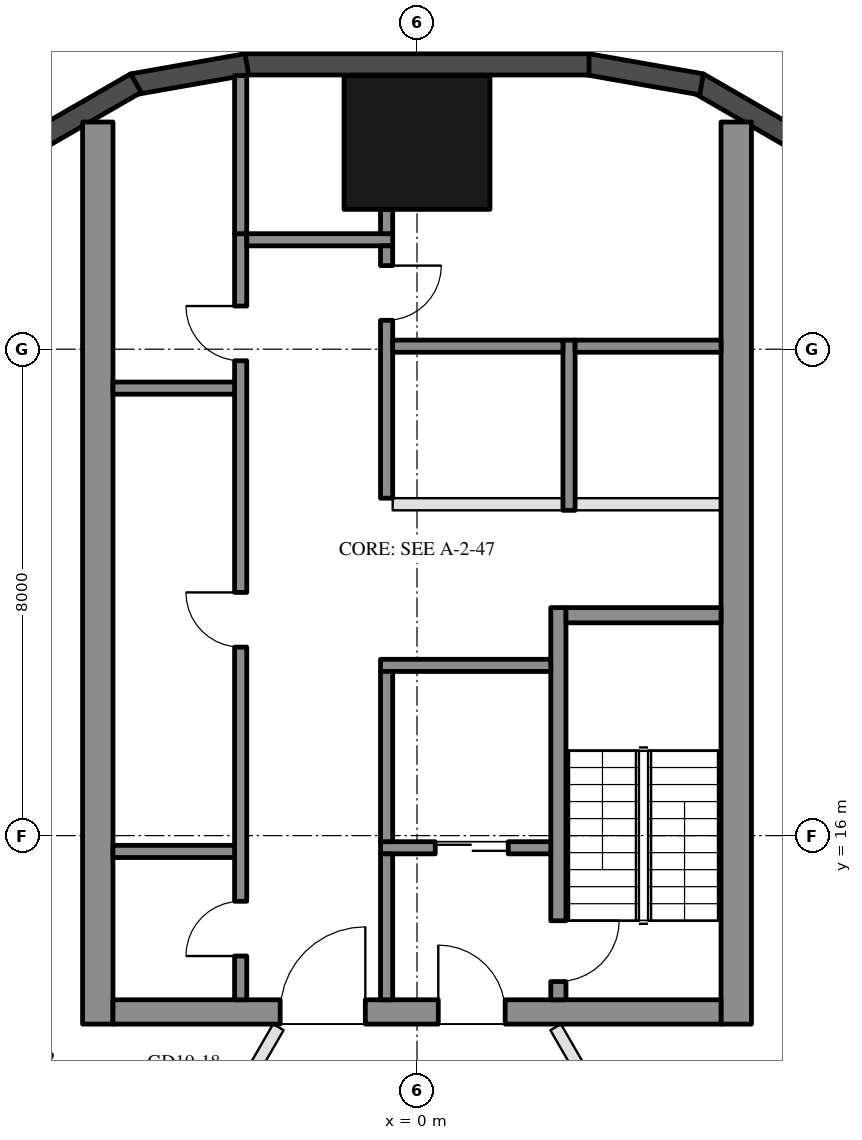
"""IFC4 building model, lengths in metres.
Left out: names, types, materials, properties, quantities, classifications, styles, units other than length and angle.
Written with IfcOpenShell. Run it as: python <this file> out.ifc"""

import sys

from ifc_helpers import new_model, si_unit, direction, frame, frame_2d, origin, origin_2d, place, context, subcontext, project, spatial, rectangle, hollow_rectangle, extrude, element, fill, save


model = new_model("IFC4")
c1 = context("Model", 3, precision=1e-05, world=origin(), true_north=direction((0.0, 1.0)))
c2 = subcontext(c1, "Body", "Model", "MODEL_VIEW")
j1 = project(units=[si_unit("LENGTHUNIT", "METRE"), si_unit("PLANEANGLEUNIT", "RADIAN")], contexts=[c1])
p1 = place(None, origin())
s1 = spatial("IfcSite", under=j1, at=p1, CompositionType="ELEMENT")
p2 = place(p1, origin())
s2 = spatial("IfcBuilding", under=s1, at=p2, CompositionType="ELEMENT")
p3 = place(p2, frame((0.0, 0.0, 205.8)))
s3 = spatial("IfcBuildingStorey", under=s2, at=p3, CompositionType="ELEMENT", Elevation=205.8)
p4 = place(p3, frame((0.0, 27.4, 0.0), z_axis=(0.0, 0.0, 1.0), x_axis=(1.0, 0.0, 0.0)))
e1 = element("IfcColumn", 1, at=p4, inside=s3, PredefinedType="COLUMN", context=c2, shape_type="SweptSolid", body=[
    extrude(hollow_rectangle(XDim=2.4, YDim=2.2, WallThickness=0.06, at=origin_2d()), origin(), (0.0, 0.0, 1.0), 3.7),
])
for number, where, z_axis, x_axis in (
    (2, (6.277, 27.422, 0.0), (0.0, 0.0, 1.0), (-0.866, 0.5, 0.0)),
    (3, (4.68, 28.356, 0.0), (0.0, 0.0, 1.0), (-0.985, 0.174, 0.0)),
):
    element("IfcWall", number, at=place(p3, frame(where, z_axis=z_axis, x_axis=x_axis)), inside=s3, PredefinedType="SOLIDWALL", context=c2, shape_type="SweptSolid", body=[
        extrude(rectangle(XDim=1.91, YDim=0.35, at=frame_2d((0.955, 0.0))), origin(), (0.0, 0.0, 1.0), 3.55),
    ])
p5 = place(p3, frame((2.829, 28.685, 0.0), z_axis=(0.0, 0.0, 1.0), x_axis=(-1.0, 0.0, 0.0)))
e4 = element("IfcWall", 4, at=p5, inside=s3, PredefinedType="SOLIDWALL", context=c2, shape_type="SweptSolid", body=[
    extrude(rectangle(XDim=5.658, YDim=0.35, at=frame_2d((2.829, 0.0))), origin(), (0.0, 0.0, 1.0), 3.55),
])
for number, where, z_axis, x_axis in (
    (5, (-2.799, 28.688, 0.0), (0.0, 0.0, 1.0), (-0.985, -0.174, 0.0)),
    (6, (-4.623, 28.377, 0.0), (0.0, 0.0, 1.0), (-0.866, -0.5, 0.0)),
):
    element("IfcWall", number, at=place(p3, frame(where, z_axis=z_axis, x_axis=x_axis)), inside=s3, PredefinedType="SOLIDWALL", context=c2, shape_type="SweptSolid", body=[
        extrude(rectangle(XDim=1.91, YDim=0.35, at=frame_2d((0.955, 0.0))), origin(), (0.0, 0.0, 1.0), 3.55),
    ])
for number, where, z_axis, x_axis in (
    (7, (5.25, 12.9, 0.0), (0.0, 0.0, 1.0), (0.0, 1.0, 0.0)),
    (8, (-5.25, 12.9, 0.0), (0.0, 0.0, 1.0), (0.0, 1.0, 0.0)),
):
    element("IfcWall", number, at=place(p3, frame(where, z_axis=z_axis, x_axis=x_axis)), inside=s3, PredefinedType="SHEAR", context=c2, shape_type="SweptSolid", body=[
        extrude(rectangle(XDim=14.837, YDim=0.5, at=frame_2d((7.418, 0.0))), origin(), (0.0, 0.0, 1.0), 3.5),
    ])
p6 = place(p3, frame((5.0, 13.1, 0.0), z_axis=(0.0, 0.0, 1.0), x_axis=(-1.0, 0.0, 0.0)))
e9 = element("IfcWall", 9, at=p6, inside=s3, PredefinedType="SHEAR", context=c2, shape_type="SweptSolid", body=[
    extrude(rectangle(XDim=10.0, YDim=0.4, at=frame_2d((5.0, 0.0))), origin(), (0.0, 0.0, 1.0), 3.5),
])
p7 = place(p6, frame((3.55, 0.0, 0.0)))
e10 = element("IfcOpeningElement", 10, at=p7, cuts=e9, PredefinedType="OPENING", context=c2, shape_type="SweptSolid", body=[
    extrude(rectangle(XDim=1.1, YDim=2.1, at=frame_2d((0.55, 1.05))), frame((0.0, 0.21, 0.0), z_axis=(0.0, -1.0, 0.0), x_axis=(1.0, 0.0, 0.0)), (0.0, 0.0, 1.0), 0.42),
])
p8 = place(p6, frame((5.85, 0.0, 0.0)))
e11 = element("IfcOpeningElement", 11, at=p8, cuts=e9, PredefinedType="OPENING", context=c2, shape_type="SweptSolid", body=[
    extrude(rectangle(XDim=1.4, YDim=2.1, at=frame_2d((0.7, 1.05))), frame((0.0, 0.21, 0.0), z_axis=(0.0, -1.0, 0.0), x_axis=(1.0, 0.0, 0.0)), (0.0, 0.0, 1.0), 0.42),
])
p9 = place(p3, frame((2.325, 13.3, 0.0), z_axis=(0.0, 0.0, 1.0), x_axis=(0.0, 1.0, 0.0)))
e12 = element("IfcWall", 12, at=p9, inside=s3, PredefinedType="SHEAR", context=c2, shape_type="SweptSolid", body=[
    extrude(rectangle(XDim=6.45, YDim=0.25, at=frame_2d((3.225, 0.0))), origin(), (0.0, 0.0, 1.0), 3.5),
])
p10 = place(p9, frame((0.3, 0.0, 0.0)))
e13 = element("IfcOpeningElement", 13, at=p10, cuts=e12, PredefinedType="OPENING", context=c2, shape_type="SweptSolid", body=[
    extrude(rectangle(XDim=1.0, YDim=2.1, at=frame_2d((0.5, 1.05))), frame((0.0, 0.135, 0.0), z_axis=(0.0, -1.0, 0.0), x_axis=(1.0, 0.0, 0.0)), (0.0, 0.0, 1.0), 0.27),
])
p11 = place(p3, frame((5.0, 19.625, 0.0), z_axis=(0.0, 0.0, 1.0), x_axis=(-1.0, 0.0, 0.0)))
e14 = element("IfcWall", 14, at=p11, inside=s3, PredefinedType="SHEAR", context=c2, shape_type="SweptSolid", body=[
    extrude(rectangle(XDim=2.55, YDim=0.25, at=frame_2d((1.275, 0.0))), origin(), (0.0, 0.0, 1.0), 3.5),
])
p12 = place(p3, frame((2.2, 18.8, 0.0), z_axis=(0.0, 0.0, 1.0), x_axis=(-1.0, 0.0, 0.0)))
e15 = element("IfcWall", 15, at=p12, inside=s3, PredefinedType="SHEAR", context=c2, shape_type="SweptSolid", body=[
    extrude(rectangle(XDim=2.8, YDim=0.2, at=frame_2d((1.4, 0.0))), origin(), (0.0, 0.0, 1.0), 3.5),
])
p13 = place(p3, frame((2.2, 15.8, 0.0), z_axis=(0.0, 0.0, 1.0), x_axis=(-1.0, 0.0, 0.0)))
e16 = element("IfcWall", 16, at=p13, inside=s3, PredefinedType="SHEAR", context=c2, shape_type="SweptSolid", body=[
    extrude(rectangle(XDim=2.8, YDim=0.2, at=frame_2d((1.4, 0.0))), origin(), (0.0, 0.0, 1.0), 3.5),
])
p14 = place(p13, frame((0.7, 0.0, 0.0)))
e17 = element("IfcOpeningElement", 17, at=p14, cuts=e16, PredefinedType="OPENING", context=c2, shape_type="SweptSolid", body=[
    extrude(rectangle(XDim=1.2, YDim=2.1, at=frame_2d((0.6, 1.05))), frame((0.0, 0.11, 0.0), z_axis=(0.0, -1.0, 0.0), x_axis=(1.0, 0.0, 0.0)), (0.0, 0.0, 1.0), 0.22),
])
p15 = place(p3, frame((-0.5, 15.9, 0.0), z_axis=(0.0, 0.0, 1.0), x_axis=(0.0, 1.0, 0.0)))
e18 = element("IfcWall", 18, at=p15, inside=s3, PredefinedType="SHEAR", context=c2, shape_type="SweptSolid", body=[
    extrude(rectangle(XDim=2.8, YDim=0.2, at=frame_2d((1.4, 0.0))), origin(), (0.0, 0.0, 1.0), 3.5),
])
p16 = place(p3, frame((-0.5, 13.3, 0.0), z_axis=(0.0, 0.0, 1.0), x_axis=(0.0, 1.0, 0.0)))
e19 = element("IfcWall", 19, at=p16, inside=s3, PredefinedType="SHEAR", context=c2, shape_type="SweptSolid", body=[
    extrude(rectangle(XDim=2.4, YDim=0.2, at=frame_2d((1.2, 0.0))), origin(), (0.0, 0.0, 1.0), 3.5),
])
p17 = place(p3, frame((-2.9, 13.3, 0.0), z_axis=(0.0, 0.0, 1.0), x_axis=(0.0, 1.0, 0.0)))
e20 = element("IfcWall", 20, at=p17, inside=s3, PredefinedType="SHEAR", context=c2, shape_type="SweptSolid", body=[
    extrude(rectangle(XDim=12.6, YDim=0.2, at=frame_2d((6.3, 0.0))), origin(), (0.0, 0.0, 1.0), 3.5),
])
p18 = place(p17, frame((0.72, 0.0, 0.0)))
e21 = element("IfcOpeningElement", 21, at=p18, cuts=e20, PredefinedType="OPENING", context=c2, shape_type="SweptSolid", body=[
    extrude(rectangle(XDim=0.9, YDim=2.1, at=frame_2d((0.45, 1.05))), frame((0.0, 0.11, 0.0), z_axis=(0.0, -1.0, 0.0), x_axis=(1.0, 0.0, 0.0)), (0.0, 0.0, 1.0), 0.22),
])
p19 = place(p17, frame((5.8, 0.0, 0.0)))
e22 = element("IfcOpeningElement", 22, at=p19, cuts=e20, PredefinedType="OPENING", context=c2, shape_type="SweptSolid", body=[
    extrude(rectangle(XDim=0.9, YDim=2.1, at=frame_2d((0.45, 1.05))), frame((0.0, 0.11, 0.0), z_axis=(0.0, -1.0, 0.0), x_axis=(1.0, 0.0, 0.0)), (0.0, 0.0, 1.0), 0.22),
])
p20 = place(p17, frame((10.51, 0.0, 0.0)))
e23 = element("IfcOpeningElement", 23, at=p20, cuts=e20, PredefinedType="OPENING", context=c2, shape_type="SweptSolid", body=[
    extrude(rectangle(XDim=0.9, YDim=2.1, at=frame_2d((0.45, 1.05))), frame((0.0, 0.11, 0.0), z_axis=(0.0, -1.0, 0.0), x_axis=(1.0, 0.0, 0.0)), (0.0, 0.0, 1.0), 0.22),
])
p21 = place(p3, frame((-0.4, 25.8, 0.0), z_axis=(0.0, 0.0, 1.0), x_axis=(-1.0, 0.0, 0.0)))
e24 = element("IfcWall", 24, at=p21, inside=s3, PredefinedType="SHEAR", context=c2, shape_type="SweptSolid", body=[
    extrude(rectangle(XDim=2.4, YDim=0.2, at=frame_2d((1.2, 0.0))), origin(), (0.0, 0.0, 1.0), 3.5),
])
p22 = place(p3, frame((-0.5, 21.55, 0.0), z_axis=(0.0, 0.0, 1.0), x_axis=(0.0, 1.0, 0.0)))
e25 = element("IfcWall", 25, at=p22, inside=s3, PredefinedType="SHEAR", context=c2, shape_type="SweptSolid", body=[
    extrude(rectangle(XDim=4.15, YDim=0.2, at=frame_2d((2.075, 0.0))), origin(), (0.0, 0.0, 1.0), 3.5),
])
p23 = place(p22, frame((2.925, 0.0, 0.0)))
e26 = element("IfcOpeningElement", 26, at=p23, cuts=e25, PredefinedType="OPENING", context=c2, shape_type="SweptSolid", body=[
    extrude(rectangle(XDim=0.9, YDim=2.1, at=frame_2d((0.45, 1.05))), frame((0.0, 0.11, 0.0), z_axis=(0.0, -1.0, 0.0), x_axis=(1.0, 0.0, 0.0)), (0.0, 0.0, 1.0), 0.22),
])
for number, where, z_axis, x_axis in (
    (27, (-3.0, 15.74, 0.0), (0.0, 0.0, 1.0), (-1.0, 0.0, 0.0)),
    (28, (-3.0, 23.36, 0.0), (0.0, 0.0, 1.0), (-1.0, 0.0, 0.0)),
):
    element("IfcWall", number, at=place(p3, frame(where, z_axis=z_axis, x_axis=x_axis)), inside=s3, PredefinedType="SHEAR", context=c2, shape_type="SweptSolid", body=[
        extrude(rectangle(XDim=2.0, YDim=0.2, at=frame_2d((1.0, 0.0))), origin(), (0.0, 0.0, 1.0), 3.5),
    ])
p24 = place(p3, frame((-0.5, 25.9, 0.0), z_axis=(0.0, 0.0, 1.0), x_axis=(0.0, 1.0, 0.0)))
e29 = element("IfcWall", 29, at=p24, inside=s3, PredefinedType="SHEAR", context=c2, shape_type="SweptSolid", body=[
    extrude(rectangle(XDim=0.4, YDim=0.2, at=frame_2d((0.2, 0.0))), origin(), (0.0, 0.0, 1.0), 3.5),
])
p25 = place(p3, frame((-2.9, 25.9, 0.0), z_axis=(0.0, 0.0, 1.0), x_axis=(0.0, 1.0, 0.0)))
e30 = element("IfcWall", 30, at=p25, inside=s3, PredefinedType="SHEAR", context=c2, shape_type="SweptSolid", body=[
    extrude(rectangle(XDim=2.6, YDim=0.2, at=frame_2d((1.3, 0.0))), origin(), (0.0, 0.0, 1.0), 3.5),
])
p26 = place(p3, frame((2.5, 21.35, 0.0), z_axis=(0.0, 0.0, 1.0), x_axis=(0.0, 1.0, 0.0)))
e31 = element("IfcWall", 31, at=p26, inside=s3, PredefinedType="SHEAR", context=c2, shape_type="SweptSolid", body=[
    extrude(rectangle(XDim=2.8, YDim=0.2, at=frame_2d((1.4, 0.0))), origin(), (0.0, 0.0, 1.0), 3.5),
])
p27 = place(p3, frame((5.0, 24.05, 0.0), z_axis=(0.0, 0.0, 1.0), x_axis=(-1.0, 0.0, 0.0)))
e32 = element("IfcWall", 32, at=p27, inside=s3, PredefinedType="SHEAR", context=c2, shape_type="SweptSolid", body=[
    extrude(rectangle(XDim=2.4, YDim=0.2, at=frame_2d((1.2, 0.0))), origin(), (0.0, 0.0, 1.0), 3.5),
])
p28 = place(p3, frame((2.4, 24.05, 0.0), z_axis=(0.0, 0.0, 1.0), x_axis=(-1.0, 0.0, 0.0)))
e33 = element("IfcWall", 33, at=p28, inside=s3, PredefinedType="SHEAR", context=c2, shape_type="SweptSolid", body=[
    extrude(rectangle(XDim=2.8, YDim=0.2, at=frame_2d((1.4, 0.0))), origin(), (0.0, 0.0, 1.0), 3.5),
])
p29 = place(p3, frame((5.0, 21.45, 0.0), z_axis=(0.0, 0.0, 1.0), x_axis=(-1.0, 0.0, 0.0)))
e34 = element("IfcWall", 34, at=p29, inside=s3, PredefinedType="PARTITIONING", context=c2, shape_type="SweptSolid", body=[
    extrude(rectangle(XDim=2.4, YDim=0.2, at=frame_2d((1.2, 0.0))), origin(), (0.0, 0.0, 1.0), 3.5),
])
p30 = place(p3, frame((2.4, 21.45, 0.0), z_axis=(0.0, 0.0, 1.0), x_axis=(-1.0, 0.0, 0.0)))
e35 = element("IfcWall", 35, at=p30, inside=s3, PredefinedType="PARTITIONING", context=c2, shape_type="SweptSolid", body=[
    extrude(rectangle(XDim=2.8, YDim=0.2, at=frame_2d((1.4, 0.0))), origin(), (0.0, 0.0, 1.0), 3.5),
])
p31 = place(p3, frame((14.722, 13.061, 0.0), z_axis=(0.0, 0.0, 1.0), x_axis=(-0.881785716662, -0.471650241059, 0.0)))
e36 = element("IfcWall", 36, at=p31, inside=s3, PredefinedType="PARTITIONING", context=c2, shape_type="SweptSolid", body=[
    extrude(rectangle(XDim=10.986, YDim=0.2, at=frame_2d((5.493, 0.0))), origin(), (0.0, 0.0, 1.0), 2.95),
])
p32 = place(p3, frame((-13.147, 13.989, 0.0), z_axis=(0.0, 0.0, 1.0), x_axis=(0.892898572595, -0.450257858408, 0.0)))
e37 = element("IfcWall", 37, at=p32, inside=s3, PredefinedType="PARTITIONING", context=c2, shape_type="SweptSolid", body=[
    extrude(rectangle(XDim=10.096, YDim=0.2, at=frame_2d((5.048, 0.0))), origin(), (0.0, 0.0, 1.0), 3.06),
])
p33 = place(p3, frame((2.281, 12.85, 0.0), z_axis=(0.0, 0.0, 1.0), x_axis=(0.500003731568, -0.866023249352, 0.0)))
e38 = element("IfcWall", 38, at=p33, inside=s3, PredefinedType="PARTITIONING", context=c2, shape_type="SweptSolid", body=[
    extrude(rectangle(XDim=5.585, YDim=0.2, at=frame_2d((2.792, 0.0))), origin(), (0.0, 0.0, 1.0), 2.95),
])
p34 = place(p33, frame((2.292, 0.0, 0.0)))
e39 = element("IfcOpeningElement", 39, at=p34, cuts=e38, PredefinedType="OPENING", context=c2, shape_type="SweptSolid", body=[
    extrude(rectangle(XDim=1.0, YDim=2.1, at=frame_2d((0.5, 1.05))), frame((0.0, 0.11, 0.0), z_axis=(0.0, -1.0, 0.0), x_axis=(1.0, 0.0, 0.0)), (0.0, 0.0, 1.0), 0.22),
])
p35 = place(p3, frame((-4.172, 9.574, 0.0), z_axis=(0.0, 0.0, 1.0), x_axis=(0.499985062256, 0.866034027923, 0.0)))
e40 = element("IfcWall", 40, at=p35, inside=s3, PredefinedType="PARTITIONING", context=c2, shape_type="SweptSolid", body=[
    extrude(rectangle(XDim=3.782, YDim=0.2, at=frame_2d((1.891, 0.0))), origin(), (0.0, 0.0, 1.0), 2.95),
])
p36 = place(p35, frame((1.391, 0.0, 0.0)))
e41 = element("IfcOpeningElement", 41, at=p36, cuts=e40, PredefinedType="OPENING", context=c2, shape_type="SweptSolid", body=[
    extrude(rectangle(XDim=1.0, YDim=2.1, at=frame_2d((0.5, 1.05))), frame((0.0, 0.11, 0.0), z_axis=(0.0, -1.0, 0.0), x_axis=(1.0, 0.0, 0.0)), (0.0, 0.0, 1.0), 0.22),
])
p37 = place(p14, origin())
e42 = element("IfcDoor", 42, at=p37, inside=s3, OperationType="DOUBLE_DOOR_SLIDING", PredefinedType="DOOR", context=c2, shape_type="SweptSolid", body=[
    extrude(rectangle(XDim=1.2, YDim=2.1, at=frame_2d((0.6, 1.05))), frame((0.0, 0.025, 0.0), z_axis=(0.0, -1.0, 0.0), x_axis=(1.0, 0.0, 0.0)), (0.0, 0.0, 1.0), 0.05),
])
fill(e17, e42)
p38 = place(p18, origin())
e43 = element("IfcDoor", 43, at=p38, inside=s3, OperationType="SINGLE_SWING_LEFT", PredefinedType="DOOR", context=c2, shape_type="SweptSolid", body=[
    extrude(rectangle(XDim=0.9, YDim=2.1, at=frame_2d((0.45, 1.05))), frame((0.0, 0.025, 0.0), z_axis=(0.0, -1.0, 0.0), x_axis=(1.0, 0.0, 0.0)), (0.0, 0.0, 1.0), 0.05),
])
fill(e21, e43)
p39 = place(p19, origin())
e44 = element("IfcDoor", 44, at=p39, inside=s3, OperationType="SINGLE_SWING_RIGHT", PredefinedType="DOOR", context=c2, shape_type="SweptSolid", body=[
    extrude(rectangle(XDim=0.9, YDim=2.1, at=frame_2d((0.45, 1.05))), frame((0.0, 0.025, 0.0), z_axis=(0.0, -1.0, 0.0), x_axis=(1.0, 0.0, 0.0)), (0.0, 0.0, 1.0), 0.05),
])
fill(e22, e44)
p40 = place(p20, origin())
e45 = element("IfcDoor", 45, at=p40, inside=s3, OperationType="SINGLE_SWING_RIGHT", PredefinedType="DOOR", context=c2, shape_type="SweptSolid", body=[
    extrude(rectangle(XDim=0.9, YDim=2.1, at=frame_2d((0.45, 1.05))), frame((0.0, 0.025, 0.0), z_axis=(0.0, -1.0, 0.0), x_axis=(1.0, 0.0, 0.0)), (0.0, 0.0, 1.0), 0.05),
])
fill(e23, e45)
p41 = place(p23, frame((0.9, 0.0, 0.0), z_axis=(0.0, 0.0, 1.0), x_axis=(-1.0, 0.0, 0.0)))
e46 = element("IfcDoor", 46, at=p41, inside=s3, OperationType="SINGLE_SWING_LEFT", PredefinedType="DOOR", context=c2, shape_type="SweptSolid", body=[
    extrude(rectangle(XDim=0.9, YDim=2.1, at=frame_2d((0.45, 1.05))), frame((0.0, 0.025, 0.0), z_axis=(0.0, -1.0, 0.0), x_axis=(1.0, 0.0, 0.0)), (0.0, 0.0, 1.0), 0.05),
])
fill(e26, e46)
p42 = place(p7, frame((1.1, 0.0, 0.0), z_axis=(0.0, 0.0, 1.0), x_axis=(-1.0, 0.0, 0.0)))
e47 = element("IfcDoor", 47, at=p42, inside=s3, OperationType="SINGLE_SWING_LEFT", PredefinedType="DOOR", context=c2, shape_type="SweptSolid", body=[
    extrude(rectangle(XDim=1.1, YDim=2.1, at=frame_2d((0.55, 1.05))), frame((0.0, 0.025, 0.0), z_axis=(0.0, -1.0, 0.0), x_axis=(1.0, 0.0, 0.0)), (0.0, 0.0, 1.0), 0.05),
])
fill(e10, e47)
p43 = place(p8, frame((1.4, 0.0, 0.0), z_axis=(0.0, 0.0, 1.0), x_axis=(-1.0, 0.0, 0.0)))
e48 = element("IfcDoor", 48, at=p43, inside=s3, OperationType="DOUBLE_DOOR_SINGLE_SWING", PredefinedType="DOOR", context=c2, shape_type="SweptSolid", body=[
    extrude(rectangle(XDim=1.4, YDim=2.1, at=frame_2d((0.7, 1.05))), frame((0.0, 0.025, 0.0), z_axis=(0.0, -1.0, 0.0), x_axis=(1.0, 0.0, 0.0)), (0.0, 0.0, 1.0), 0.05),
])
fill(e11, e48)
p44 = place(p10, frame((1.0, 0.0, 0.0), z_axis=(0.0, 0.0, 1.0), x_axis=(-1.0, 0.0, 0.0)))
e49 = element("IfcDoor", 49, at=p44, inside=s3, OperationType="SINGLE_SWING_LEFT", PredefinedType="DOOR", context=c2, shape_type="SweptSolid", body=[
    extrude(rectangle(XDim=1.0, YDim=2.1, at=frame_2d((0.5, 1.05))), frame((0.0, 0.025, 0.0), z_axis=(0.0, -1.0, 0.0), x_axis=(1.0, 0.0, 0.0)), (0.0, 0.0, 1.0), 0.05),
])
fill(e13, e49)
save(model, sys.argv[1])
